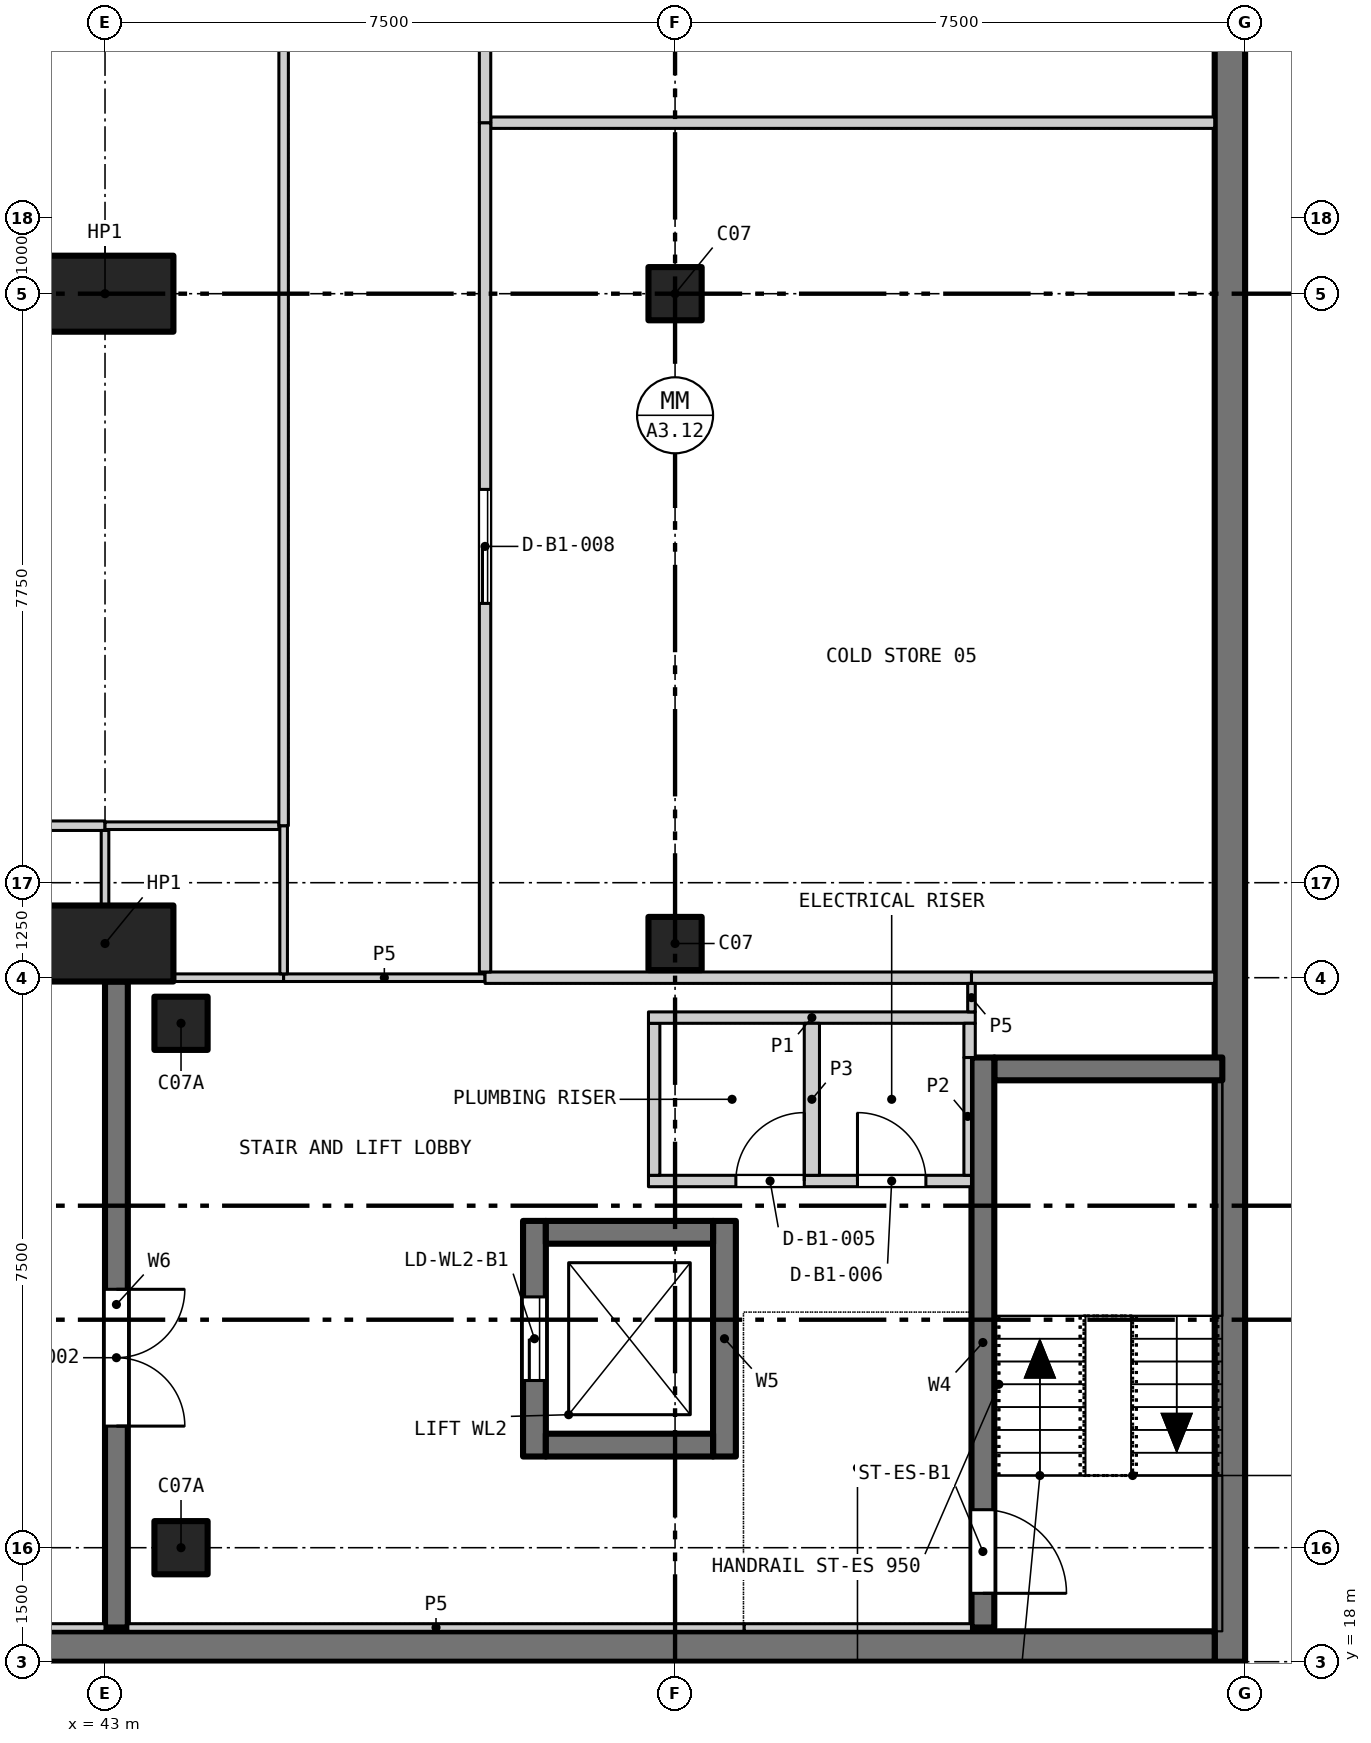
"""IFC4 building model, lengths in metres.
Left out: names, types, materials, properties, quantities, classifications, styles, units other than length and angle.
Written with IfcOpenShell. Run it as: python <this file> out.ifc"""

import sys

from ifc_helpers import new_model, si_unit, direction, frame, frame_2d, origin, origin_2d, place, context, subcontext, project, spatial, rectangle, extrude, element, fill, save


model = new_model("IFC4")
c1 = context("Model", 3, precision=1e-05, world=origin(), true_north=direction((0.0, 1.0)))
c2 = subcontext(c1, "Body", "Model", "MODEL_VIEW")
j1 = project(units=[si_unit("LENGTHUNIT", "METRE"), si_unit("PLANEANGLEUNIT", "RADIAN")], contexts=[c1])
p1 = place(None, origin())
s1 = spatial("IfcSite", under=j1, at=p1, CompositionType="ELEMENT")
p2 = place(p1, origin())
s2 = spatial("IfcBuilding", under=s1, at=p2, CompositionType="ELEMENT")
p3 = place(p2, frame((0.0, 0.0, -10.0)))
s3 = spatial("IfcBuildingStorey", under=s2, at=p3, CompositionType="ELEMENT", Elevation=-10.0)
for number, where, z_axis, x_axis in (
    (1, (50.5, 27.45, -1.4), (0.0, 0.0, 1.0), (1.0, 0.0, 0.0)),
    (2, (50.5, 36.0, -1.4), (0.0, 0.0, 1.0), (1.0, 0.0, 0.0)),
    (3, (44.0, 19.5, -1.4), (0.0, 0.0, 1.0), (1.0, 0.0, 0.0)),
    (4, (44.0, 26.4, -1.4), (0.0, 0.0, 1.0), (1.0, 0.0, 0.0)),
):
    element("IfcColumn", number, at=place(p3, frame(where, z_axis=z_axis, x_axis=x_axis)), inside=s3, PredefinedType="COLUMN", context=c2, shape_type="SweptSolid", body=[
        extrude(rectangle(XDim=0.7, YDim=0.7, at=origin_2d()), origin(), (0.0, 0.0, 1.0), 6.4),
    ])
p4 = place(p3, frame((57.8, 18.0, -1.4), z_axis=(0.0, 0.0, 1.0), x_axis=(0.0, 1.0, 0.0)))
e5 = element("IfcWall", 5, at=p4, inside=s3, PredefinedType="SOLIDWALL", context=c2, shape_type="SweptSolid", body=[
    extrude(rectangle(XDim=108.0, YDim=0.4, at=frame_2d((54.0, 0.0))), origin(), (0.0, 0.0, 1.0), 6.4),
])
p5 = place(p3, frame((0.4, 18.2, -1.4), z_axis=(0.0, 0.0, 1.0), x_axis=(1.0, 0.0, 0.0)))
e6 = element("IfcWall", 6, at=p5, inside=s3, PredefinedType="SOLIDWALL", context=c2, shape_type="SweptSolid", body=[
    extrude(rectangle(XDim=57.2, YDim=0.4, at=frame_2d((28.6, 0.0))), origin(), (0.0, 0.0, 1.0), 6.4),
])
p6 = place(p3, frame((43.15, 18.45, -1.4), z_axis=(0.0, 0.0, 1.0), x_axis=(0.0, 1.0, 0.0)))
e7 = element("IfcWall", 7, at=p6, inside=s3, PredefinedType="SOLIDWALL", context=c2, shape_type="SweptSolid", body=[
    extrude(rectangle(XDim=8.5, YDim=0.3, at=frame_2d((4.25, 0.0))), origin(), (0.0, 0.0, 1.0), 6.4),
])
p7 = place(p6, frame((2.65, 0.0, 1.4)))
e8 = element("IfcOpeningElement", 8, at=p7, cuts=e7, PredefinedType="OPENING", context=c2, shape_type="SweptSolid", body=[
    extrude(rectangle(XDim=1.8, YDim=2.1, at=frame_2d((0.9, 1.05))), frame((0.0, 0.16, 0.0), z_axis=(0.0, -1.0, 0.0), x_axis=(1.0, 0.0, 0.0)), (0.0, 0.0, 1.0), 0.32),
])
p8 = place(p3, frame((54.7, 25.8, 0.0), z_axis=(0.0, 0.0, 1.0), x_axis=(1.0, 0.0, 0.0)))
e9 = element("IfcWall", 9, at=p8, inside=s3, PredefinedType="SHEAR", context=c2, shape_type="SweptSolid", body=[
    extrude(rectangle(XDim=3.0, YDim=0.3, at=frame_2d((1.5, 0.0))), origin(), (0.0, 0.0, 1.0), 5.0),
])
p9 = place(p3, frame((54.55, 18.45, 0.0), z_axis=(0.0, 0.0, 1.0), x_axis=(0.0, 1.0, 0.0)))
e10 = element("IfcWall", 10, at=p9, inside=s3, PredefinedType="SHEAR", context=c2, shape_type="SweptSolid", body=[
    extrude(rectangle(XDim=7.5, YDim=0.3, at=frame_2d((3.75, 0.0))), origin(), (0.0, 0.0, 1.0), 5.0),
])
p10 = place(p9, frame((0.45, 0.0, 0.0)))
e11 = element("IfcOpeningElement", 11, at=p10, cuts=e10, PredefinedType="OPENING", context=c2, shape_type="SweptSolid", body=[
    extrude(rectangle(XDim=1.1, YDim=2.1, at=frame_2d((0.55, 1.05))), frame((0.0, 0.16, 0.0), z_axis=(0.0, -1.0, 0.0), x_axis=(1.0, 0.0, 0.0)), (0.0, 0.0, 1.0), 0.32),
])
p11 = place(p3, frame((48.65, 20.7, -1.4), z_axis=(0.0, 0.0, 1.0), x_axis=(0.0, 1.0, 0.0)))
e12 = element("IfcWall", 12, at=p11, inside=s3, PredefinedType="SHEAR", context=c2, shape_type="SweptSolid", body=[
    extrude(rectangle(XDim=3.1, YDim=0.3, at=frame_2d((1.55, 0.0))), origin(), (0.0, 0.0, 1.0), 6.4),
])
p12 = place(p11, frame((1.0, 0.0, 1.4)))
e13 = element("IfcOpeningElement", 13, at=p12, cuts=e12, PredefinedType="OPENING", context=c2, shape_type="SweptSolid", body=[
    extrude(rectangle(XDim=1.1, YDim=2.1, at=frame_2d((0.55, 1.05))), frame((0.0, 0.16, 0.0), z_axis=(0.0, -1.0, 0.0), x_axis=(1.0, 0.0, 0.0)), (0.0, 0.0, 1.0), 0.32),
])
p13 = place(p3, frame((51.15, 20.7, -1.4), z_axis=(0.0, 0.0, 1.0), x_axis=(0.0, 1.0, 0.0)))
e14 = element("IfcWall", 14, at=p13, inside=s3, PredefinedType="SHEAR", context=c2, shape_type="SweptSolid", body=[
    extrude(rectangle(XDim=3.1, YDim=0.3, at=frame_2d((1.55, 0.0))), origin(), (0.0, 0.0, 1.0), 6.4),
])
for number, where, z_axis, x_axis in (
    (15, (48.8, 20.85, -1.4), (0.0, 0.0, 1.0), (1.0, 0.0, 0.0)),
    (16, (48.8, 23.65, -1.4), (0.0, 0.0, 1.0), (1.0, 0.0, 0.0)),
):
    element("IfcWall", number, at=place(p3, frame(where, z_axis=z_axis, x_axis=x_axis)), inside=s3, PredefinedType="SHEAR", context=c2, shape_type="SweptSolid", body=[
        extrude(rectangle(XDim=2.2, YDim=0.3, at=frame_2d((1.1, 0.0))), origin(), (0.0, 0.0, 1.0), 6.4),
    ])
for number, where, z_axis, x_axis in (
    (17, (43.0, 27.45, -1.4), (0.0, 0.0, 1.0), (1.0, 0.0, 0.0)),
    (18, (43.0, 36.0, -1.4), (0.0, 0.0, 1.0), (1.0, 0.0, 0.0)),
):
    element("IfcColumn", number, at=place(p3, frame(where, z_axis=z_axis, x_axis=x_axis)), inside=s3, PredefinedType="COLUMN", context=c2, shape_type="SweptSolid", body=[
        extrude(rectangle(XDim=1.8, YDim=1.0, at=origin_2d()), origin(), (0.0, 0.0, 1.0), 6.4),
    ])
p14 = place(p3, frame((50.15, 24.325, 0.0), z_axis=(0.0, 0.0, 1.0), x_axis=(1.0, 0.0, 0.0)))
e19 = element("IfcWall", 19, at=p14, inside=s3, PredefinedType="PARTITIONING", context=c2, shape_type="SweptSolid", body=[
    extrude(rectangle(XDim=4.25, YDim=0.15, at=frame_2d((2.125, 0.0))), origin(), (0.0, 0.0, 1.0), 4.75),
])
p15 = place(p14, frame((1.15, 0.0, 0.0)))
e20 = element("IfcOpeningElement", 20, at=p15, cuts=e19, PredefinedType="OPENING", context=c2, shape_type="SweptSolid", body=[
    extrude(rectangle(XDim=0.9, YDim=2.1, at=frame_2d((0.45, 1.05))), frame((0.0, 0.085, 0.0), z_axis=(0.0, -1.0, 0.0), x_axis=(1.0, 0.0, 0.0)), (0.0, 0.0, 1.0), 0.17),
])
p16 = place(p14, frame((2.75, 0.0, 0.0)))
e21 = element("IfcOpeningElement", 21, at=p16, cuts=e19, PredefinedType="OPENING", context=c2, shape_type="SweptSolid", body=[
    extrude(rectangle(XDim=0.9, YDim=2.1, at=frame_2d((0.45, 1.05))), frame((0.0, 0.085, 0.0), z_axis=(0.0, -1.0, 0.0), x_axis=(1.0, 0.0, 0.0)), (0.0, 0.0, 1.0), 0.17),
])
p17 = place(p3, frame((50.225, 24.4, 0.0), z_axis=(0.0, 0.0, 1.0), x_axis=(0.0, 1.0, 0.0)))
e22 = element("IfcWall", 22, at=p17, inside=s3, PredefinedType="PARTITIONING", context=c2, shape_type="SweptSolid", body=[
    extrude(rectangle(XDim=2.0, YDim=0.15, at=frame_2d((1.0, 0.0))), origin(), (0.0, 0.0, 1.0), 4.75),
])
p18 = place(p3, frame((50.15, 26.475, 0.0), z_axis=(0.0, 0.0, 1.0), x_axis=(1.0, 0.0, 0.0)))
e23 = element("IfcWall", 23, at=p18, inside=s3, PredefinedType="PARTITIONING", context=c2, shape_type="SweptSolid", body=[
    extrude(rectangle(XDim=4.3, YDim=0.15, at=frame_2d((2.15, 0.0))), origin(), (0.0, 0.0, 1.0), 3.35),
])
p19 = place(p3, frame((52.3, 24.4, 0.0), z_axis=(0.0, 0.0, 1.0), x_axis=(0.0, 1.0, 0.0)))
e24 = element("IfcWall", 24, at=p19, inside=s3, PredefinedType="PARTITIONING", context=c2, shape_type="SweptSolid", body=[
    extrude(rectangle(XDim=2.0, YDim=0.2, at=frame_2d((1.0, 0.0))), origin(), (0.0, 0.0, 1.0), 4.75),
])
p20 = place(p3, frame((54.35, 24.4, 0.0), z_axis=(0.0, 0.0, 1.0), x_axis=(0.0, 1.0, 0.0)))
e25 = element("IfcWall", 25, at=p20, inside=s3, PredefinedType="PARTITIONING", context=c2, shape_type="SweptSolid", body=[
    extrude(rectangle(XDim=1.55, YDim=0.1, at=frame_2d((0.775, 0.0))), origin(), (0.0, 0.0, 1.0), 4.75),
])
p21 = place(p3, frame((54.375, 25.95, 0.0), z_axis=(0.0, 0.0, 1.0), x_axis=(0.0, 1.0, 0.0)))
e26 = element("IfcWall", 26, at=p21, inside=s3, PredefinedType="PARTITIONING", context=c2, shape_type="SweptSolid", body=[
    extrude(rectangle(XDim=0.45, YDim=0.15, at=frame_2d((0.225, 0.0))), origin(), (0.0, 0.0, 1.0), 4.75),
])
p22 = place(p3, frame((15.0, 18.45, 0.0), z_axis=(0.0, 0.0, 1.0), x_axis=(1.0, 0.0, 0.0)))
e27 = element("IfcWall", 27, at=p22, inside=s3, PredefinedType="PARTITIONING", context=c2, shape_type="SweptSolid", body=[
    extrude(rectangle(XDim=28.0, YDim=0.1, at=frame_2d((14.0, 0.0))), origin(), (0.0, 0.0, 1.0), 4.75),
])
p23 = place(p3, frame((43.3, 18.45, 0.0), z_axis=(0.0, 0.0, 1.0), x_axis=(1.0, 0.0, 0.0)))
e28 = element("IfcWall", 28, at=p23, inside=s3, PredefinedType="PARTITIONING", context=c2, shape_type="SweptSolid", body=[
    extrude(rectangle(XDim=8.11, YDim=0.1, at=frame_2d((4.055, 0.0))), origin(), (0.0, 0.0, 1.0), 4.75),
])
p24 = place(p3, frame((51.41, 18.45, 0.0), z_axis=(0.0, 0.0, 1.0), x_axis=(1.0, 0.0, 0.0)))
e29 = element("IfcWall", 29, at=p24, inside=s3, PredefinedType="PARTITIONING", context=c2, shape_type="SweptSolid", body=[
    extrude(rectangle(XDim=2.99, YDim=0.1, at=frame_2d((1.495, 0.0))), origin(), (0.0, 0.0, 1.0), 4.75),
])
p25 = place(p3, frame((43.9, 27.0, 0.0), z_axis=(0.0, 0.0, 1.0), x_axis=(1.0, 0.0, 0.0)))
e30 = element("IfcWall", 30, at=p25, inside=s3, PredefinedType="PARTITIONING", context=c2, shape_type="SweptSolid", body=[
    extrude(rectangle(XDim=1.45, YDim=0.1, at=frame_2d((0.725, 0.0))), origin(), (0.0, 0.0, 1.0), 4.75),
])
p26 = place(p3, frame((45.35, 27.0, 0.0), z_axis=(0.0, 0.0, 1.0), x_axis=(1.0, 0.0, 0.0)))
e31 = element("IfcWall", 31, at=p26, inside=s3, PredefinedType="PARTITIONING", context=c2, shape_type="SweptSolid", body=[
    extrude(rectangle(XDim=2.65, YDim=0.1, at=frame_2d((1.325, 0.0))), origin(), (0.0, 0.0, 1.0), 4.75),
])
p27 = place(p3, frame((48.0, 27.0, 0.0), z_axis=(0.0, 0.0, 1.0), x_axis=(1.0, 0.0, 0.0)))
e32 = element("IfcWall", 32, at=p27, inside=s3, PredefinedType="PARTITIONING", context=c2, shape_type="SweptSolid", body=[
    extrude(rectangle(XDim=6.4, YDim=0.15, at=frame_2d((3.2, 0.0))), origin(), (0.0, 0.0, 1.0), 4.75),
])
p28 = place(p3, frame((54.4, 27.0, 0.0), z_axis=(0.0, 0.0, 1.0), x_axis=(1.0, 0.0, 0.0)))
e33 = element("IfcWall", 33, at=p28, inside=s3, PredefinedType="PARTITIONING", context=c2, shape_type="SweptSolid", body=[
    extrude(rectangle(XDim=3.2, YDim=0.15, at=frame_2d((1.6, 0.0))), origin(), (0.0, 0.0, 1.0), 4.75),
])
p29 = place(p3, frame((33.51, 29.0, 0.0), z_axis=(0.0, 0.0, 1.0), x_axis=(1.0, 0.0, 0.0)))
e34 = element("IfcWall", 34, at=p29, inside=s3, PredefinedType="PARTITIONING", context=c2, shape_type="SweptSolid", body=[
    extrude(rectangle(XDim=9.49, YDim=0.125, at=frame_2d((4.745, 0.0))), origin(), (0.0, 0.0, 1.0), 4.75),
])
p30 = place(p3, frame((43.0, 29.0, 0.0), z_axis=(0.0, 0.0, 1.0), x_axis=(1.0, 0.0, 0.0)))
e35 = element("IfcWall", 35, at=p30, inside=s3, PredefinedType="PARTITIONING", context=c2, shape_type="SweptSolid", body=[
    extrude(rectangle(XDim=2.288, YDim=0.1, at=frame_2d((1.144, 0.0))), origin(), (0.0, 0.0, 1.0), 4.75),
])
p31 = place(p3, frame((48.075, 38.25, 0.0), z_axis=(0.0, 0.0, 1.0), x_axis=(1.0, 0.0, 0.0)))
e36 = element("IfcWall", 36, at=p31, inside=s3, PredefinedType="PARTITIONING", context=c2, shape_type="SweptSolid", body=[
    extrude(rectangle(XDim=9.525, YDim=0.15, at=frame_2d((4.763, 0.0))), origin(), (0.0, 0.0, 1.0), 4.75),
])
p32 = place(p3, frame((43.0, 27.95, 0.0), z_axis=(0.0, 0.0, 1.0), x_axis=(0.0, 1.0, 0.0)))
e37 = element("IfcWall", 37, at=p32, inside=s3, PredefinedType="PARTITIONING", context=c2, shape_type="SweptSolid", body=[
    extrude(rectangle(XDim=0.988, YDim=0.1, at=frame_2d((0.494, 0.0))), origin(), (0.0, 0.0, 1.0), 4.75),
])
p33 = place(p3, frame((45.35, 27.05, 0.0), z_axis=(0.0, 0.0, 1.0), x_axis=(0.0, 1.0, 0.0)))
e38 = element("IfcWall", 38, at=p33, inside=s3, PredefinedType="PARTITIONING", context=c2, shape_type="SweptSolid", body=[
    extrude(rectangle(XDim=1.95, YDim=0.1, at=frame_2d((0.975, 0.0))), origin(), (0.0, 0.0, 1.0), 4.75),
])
p34 = place(p3, frame((45.35, 29.0, 0.0), z_axis=(0.0, 0.0, 1.0), x_axis=(0.0, 1.0, 0.0)))
e39 = element("IfcWall", 39, at=p34, inside=s3, PredefinedType="PARTITIONING", context=c2, shape_type="SweptSolid", body=[
    extrude(rectangle(XDim=20.5, YDim=0.125, at=frame_2d((10.25, 0.0))), origin(), (0.0, 0.0, 1.0), 4.75),
])
p35 = place(p3, frame((48.0, 27.075, 0.0), z_axis=(0.0, 0.0, 1.0), x_axis=(0.0, 1.0, 0.0)))
e40 = element("IfcWall", 40, at=p35, inside=s3, PredefinedType="PARTITIONING", context=c2, shape_type="SweptSolid", body=[
    extrude(rectangle(XDim=11.175, YDim=0.15, at=frame_2d((5.587, 0.0))), origin(), (0.0, 0.0, 1.0), 4.75),
])
p36 = place(p35, frame((4.85, 0.0, 0.0)))
e41 = element("IfcOpeningElement", 41, at=p36, cuts=e40, PredefinedType="OPENING", context=c2, shape_type="SweptSolid", body=[
    extrude(rectangle(XDim=1.5, YDim=2.4, at=frame_2d((0.75, 1.2))), frame((0.0, 0.085, 0.0), z_axis=(0.0, -1.0, 0.0), x_axis=(1.0, 0.0, 0.0)), (0.0, 0.0, 1.0), 0.17),
])
p37 = place(p3, frame((48.0, 38.25, 0.0), z_axis=(0.0, 0.0, 1.0), x_axis=(0.0, 1.0, 0.0)))
e42 = element("IfcWall", 42, at=p37, inside=s3, PredefinedType="PARTITIONING", context=c2, shape_type="SweptSolid", body=[
    extrude(rectangle(XDim=11.25, YDim=0.15, at=frame_2d((5.625, 0.0))), origin(), (0.0, 0.0, 1.0), 4.75),
])
p38 = place(p37, frame((4.9, 0.0, 0.0)))
e43 = element("IfcOpeningElement", 43, at=p38, cuts=e42, PredefinedType="OPENING", context=c2, shape_type="SweptSolid", body=[
    extrude(rectangle(XDim=1.5, YDim=2.4, at=frame_2d((0.75, 1.2))), frame((0.0, 0.085, 0.0), z_axis=(0.0, -1.0, 0.0), x_axis=(1.0, 0.0, 0.0)), (0.0, 0.0, 1.0), 0.17),
])
p39 = place(p3, frame((54.4, 26.55, 0.0), z_axis=(0.0, 0.0, 1.0), x_axis=(0.0, 1.0, 0.0)))
e44 = element("IfcWall", 44, at=p39, inside=s3, PredefinedType="PARTITIONING", context=c2, shape_type="SweptSolid", body=[
    extrude(rectangle(XDim=0.375, YDim=0.1, at=frame_2d((0.188, 0.0))), origin(), (0.0, 0.0, 1.0), 4.75),
])
p40 = place(p7, frame((1.8, 0.0, 0.0), z_axis=(0.0, 0.0, 1.0), x_axis=(-1.0, 0.0, 0.0)))
e45 = element("IfcDoor", 45, at=p40, inside=s3, OperationType="DOUBLE_DOOR_SINGLE_SWING", PredefinedType="DOOR", context=c2, shape_type="SweptSolid", body=[
    extrude(rectangle(XDim=1.8, YDim=2.1, at=frame_2d((0.9, 1.05))), frame((0.0, 0.025, 0.0), z_axis=(0.0, -1.0, 0.0), x_axis=(1.0, 0.0, 0.0)), (0.0, 0.0, 1.0), 0.05),
])
fill(e8, e45)
p41 = place(p15, origin())
e46 = element("IfcDoor", 46, at=p41, inside=s3, OperationType="SINGLE_SWING_RIGHT", PredefinedType="DOOR", context=c2, shape_type="SweptSolid", body=[
    extrude(rectangle(XDim=0.9, YDim=2.1, at=frame_2d((0.45, 1.05))), frame((0.0, 0.025, 0.0), z_axis=(0.0, -1.0, 0.0), x_axis=(1.0, 0.0, 0.0)), (0.0, 0.0, 1.0), 0.05),
])
fill(e20, e46)
p42 = place(p16, origin())
e47 = element("IfcDoor", 47, at=p42, inside=s3, OperationType="SINGLE_SWING_LEFT", PredefinedType="DOOR", context=c2, shape_type="SweptSolid", body=[
    extrude(rectangle(XDim=0.9, YDim=2.1, at=frame_2d((0.45, 1.05))), frame((0.0, 0.025, 0.0), z_axis=(0.0, -1.0, 0.0), x_axis=(1.0, 0.0, 0.0)), (0.0, 0.0, 1.0), 0.05),
])
fill(e21, e47)
p43 = place(p36, origin())
e48 = element("IfcDoor", 48, at=p43, inside=s3, OperationType="SLIDING_TO_LEFT", PredefinedType="DOOR", context=c2, shape_type="SweptSolid", body=[
    extrude(rectangle(XDim=1.5, YDim=2.4, at=frame_2d((0.75, 1.2))), frame((0.0, 0.025, 0.0), z_axis=(0.0, -1.0, 0.0), x_axis=(1.0, 0.0, 0.0)), (0.0, 0.0, 1.0), 0.05),
])
fill(e41, e48)
p44 = place(p10, frame((1.1, 0.0, 0.0), z_axis=(0.0, 0.0, 1.0), x_axis=(-1.0, 0.0, 0.0)))
e49 = element("IfcDoor", 49, at=p44, inside=s3, OperationType="SINGLE_SWING_RIGHT", PredefinedType="DOOR", context=c2, shape_type="SweptSolid", body=[
    extrude(rectangle(XDim=1.1, YDim=2.1, at=frame_2d((0.55, 1.05))), frame((0.0, 0.025, 0.0), z_axis=(0.0, -1.0, 0.0), x_axis=(1.0, 0.0, 0.0)), (0.0, 0.0, 1.0), 0.05),
])
fill(e11, e49)
p45 = place(p12, origin())
e50 = element("IfcDoor", 50, at=p45, inside=s3, OperationType="SLIDING_TO_LEFT", PredefinedType="DOOR", context=c2, shape_type="SweptSolid", body=[
    extrude(rectangle(XDim=1.1, YDim=2.1, at=frame_2d((0.55, 1.05))), frame((0.0, 0.025, 0.0), z_axis=(0.0, -1.0, 0.0), x_axis=(1.0, 0.0, 0.0)), (0.0, 0.0, 1.0), 0.05),
])
fill(e13, e50)
save(model, sys.argv[1])
